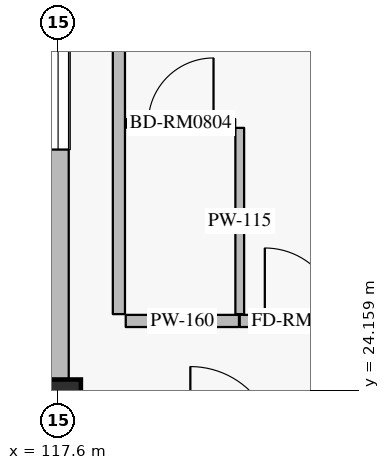
"""IFC4 building model, lengths in metres.
Left out: names, types, materials, properties, quantities, classifications, styles, units other than length and angle.
Written with IfcOpenShell. Run it as: python <this file> out.ifc"""

import sys

from ifc_helpers import new_model, si_unit, direction, frame, frame_2d, origin, origin_2d, place, context, subcontext, project, spatial, rectangle, extrude, element, fill, save


model = new_model("IFC4")
c1 = context("Model", 3, precision=1e-05, world=origin(), true_north=direction((0.0, 1.0)))
c2 = subcontext(c1, "Body", "Model", "MODEL_VIEW")
j1 = project(units=[si_unit("LENGTHUNIT", "METRE"), si_unit("PLANEANGLEUNIT", "RADIAN")], contexts=[c1])
p1 = place(None, origin())
s1 = spatial("IfcSite", under=j1, at=p1, CompositionType="ELEMENT")
p2 = place(p1, origin())
s2 = spatial("IfcBuilding", under=s1, at=p2, CompositionType="ELEMENT")
p3 = place(p2, frame((0.0, 0.0, 32.4)))
s3 = spatial("IfcBuildingStorey", under=s2, at=p3, CompositionType="ELEMENT", Elevation=32.4)
p4 = place(p3, frame((117.6, 24.0, 0.0), z_axis=(0.0, 0.0, 1.0), x_axis=(1.0, 0.0, 0.0)))
e1 = element("IfcColumn", 1, at=p4, inside=s3, PredefinedType="COLUMN", context=c2, shape_type="SweptSolid", body=[
    extrude(rectangle(XDim=0.6, YDim=0.6, at=origin_2d()), origin(), (0.0, 0.0, 1.0), 3.6),
])
p5 = place(p3, frame((117.6, 24.3, 0.0), z_axis=(0.0, 0.0, 1.0), x_axis=(0.0, 1.0, 0.0)))
e2 = element("IfcWall", 2, at=p5, inside=s3, PredefinedType="SOLIDWALL", context=c2, shape_type="SweptSolid", body=[
    extrude(rectangle(XDim=7.35, YDim=0.28, at=frame_2d((3.675, 0.0))), origin(), (0.0, 0.0, 1.0), 2.7),
])
p6 = place(p5, frame((3.025, 0.0, 0.5)))
e3 = element("IfcOpeningElement", 3, at=p6, cuts=e2, PredefinedType="OPENING", context=c2, shape_type="SweptSolid", body=[
    extrude(rectangle(XDim=1.3, YDim=1.65, at=frame_2d((0.65, 0.825))), frame((0.0, 0.15, 0.0), z_axis=(0.0, -1.0, 0.0), x_axis=(1.0, 0.0, 0.0)), (0.0, 0.0, 1.0), 0.3),
])
p7 = place(p3, frame((118.49, 25.07, 0.0), z_axis=(0.0, 0.0, 1.0), x_axis=(1.0, 0.0, 0.0)))
e4 = element("IfcWall", 4, at=p7, inside=s3, PredefinedType="PARTITIONING", context=c2, shape_type="SweptSolid", body=[
    extrude(rectangle(XDim=1.49, YDim=0.16, at=frame_2d((0.745, 0.0))), origin(), (0.0, 0.0, 1.0), 3.335),
])
p8 = place(p3, frame((119.99, 25.07, 0.0), z_axis=(0.0, 0.0, 1.0), x_axis=(1.0, 0.0, 0.0)))
e5 = element("IfcWall", 5, at=p8, inside=s3, PredefinedType="PARTITIONING", context=c2, shape_type="SweptSolid", body=[
    extrude(rectangle(XDim=1.62, YDim=0.16, at=frame_2d((0.81, 0.0))), origin(), (0.0, 0.0, 1.0), 3.335),
])
p9 = place(p8, frame((0.33, 0.0, 0.0)))
e6 = element("IfcOpeningElement", 6, at=p9, cuts=e5, PredefinedType="OPENING", context=c2, shape_type="SweptSolid", body=[
    extrude(rectangle(XDim=0.96, YDim=2.2, at=frame_2d((0.48, 1.1))), frame((0.0, 0.09, 0.0), z_axis=(0.0, -1.0, 0.0), x_axis=(1.0, 0.0, 0.0)), (0.0, 0.0, 1.0), 0.18),
])
p10 = place(p3, frame((119.99, 25.16, 0.0), z_axis=(0.0, 0.0, 1.0), x_axis=(0.0, 1.0, 0.0)))
e7 = element("IfcWall", 7, at=p10, inside=s3, PredefinedType="PARTITIONING", context=c2, shape_type="SweptSolid", body=[
    extrude(rectangle(XDim=2.45, YDim=0.115, at=frame_2d((1.225, 0.0))), origin(), (0.0, 0.0, 1.0), 3.335),
])
p11 = place(p3, frame((118.5, 27.67, 0.0), z_axis=(0.0, 0.0, 1.0), x_axis=(1.0, 0.0, 0.0)))
e8 = element("IfcWall", 8, at=p11, inside=s3, PredefinedType="PARTITIONING", context=c2, shape_type="SweptSolid", body=[
    extrude(rectangle(XDim=1.43, YDim=0.115, at=frame_2d((0.715, 0.0))), origin(), (0.0, 0.0, 1.0), 3.335),
])
p12 = place(p11, frame((0.285, 0.0, 0.0)))
e9 = element("IfcOpeningElement", 9, at=p12, cuts=e8, PredefinedType="OPENING", context=c2, shape_type="SweptSolid", body=[
    extrude(rectangle(XDim=0.86, YDim=2.12, at=frame_2d((0.43, 1.06))), frame((0.0, 0.067, 0.0), z_axis=(0.0, -1.0, 0.0), x_axis=(1.0, 0.0, 0.0)), (0.0, 0.0, 1.0), 0.135),
])
p13 = place(p3, frame((118.4, 25.16, 0.0), z_axis=(0.0, 0.0, 1.0), x_axis=(0.0, 1.0, 0.0)))
e10 = element("IfcWall", 10, at=p13, inside=s3, PredefinedType="PARTITIONING", context=c2, shape_type="SweptSolid", body=[
    extrude(rectangle(XDim=6.5, YDim=0.16, at=frame_2d((3.25, 0.0))), origin(), (0.0, 0.0, 1.0), 3.335),
])
p14 = place(p6, origin())
e11 = element("IfcWindow", 11, at=p14, inside=s3, PartitioningType="SINGLE_PANEL", PredefinedType="WINDOW", context=c2, shape_type="SweptSolid", body=[
    extrude(rectangle(XDim=1.3, YDim=1.65, at=frame_2d((0.65, 0.825))), frame((0.0, 0.03, 0.0), z_axis=(0.0, -1.0, 0.0), x_axis=(1.0, 0.0, 0.0)), (0.0, 0.0, 1.0), 0.06),
])
fill(e3, e11)
p15 = place(p9, origin())
e12 = element("IfcDoor", 12, at=p15, inside=s3, OperationType="SINGLE_SWING_LEFT", PredefinedType="DOOR", context=c2, shape_type="SweptSolid", body=[
    extrude(rectangle(XDim=0.96, YDim=2.2, at=frame_2d((0.48, 1.1))), frame((0.0, 0.025, 0.0), z_axis=(0.0, -1.0, 0.0), x_axis=(1.0, 0.0, 0.0)), (0.0, 0.0, 1.0), 0.05),
])
fill(e6, e12)
p16 = place(p12, origin())
e13 = element("IfcDoor", 13, at=p16, inside=s3, OperationType="SINGLE_SWING_RIGHT", PredefinedType="DOOR", context=c2, shape_type="SweptSolid", body=[
    extrude(rectangle(XDim=0.86, YDim=2.12, at=frame_2d((0.43, 1.06))), frame((0.0, 0.025, 0.0), z_axis=(0.0, -1.0, 0.0), x_axis=(1.0, 0.0, 0.0)), (0.0, 0.0, 1.0), 0.05),
])
fill(e9, e13)
save(model, sys.argv[1])
